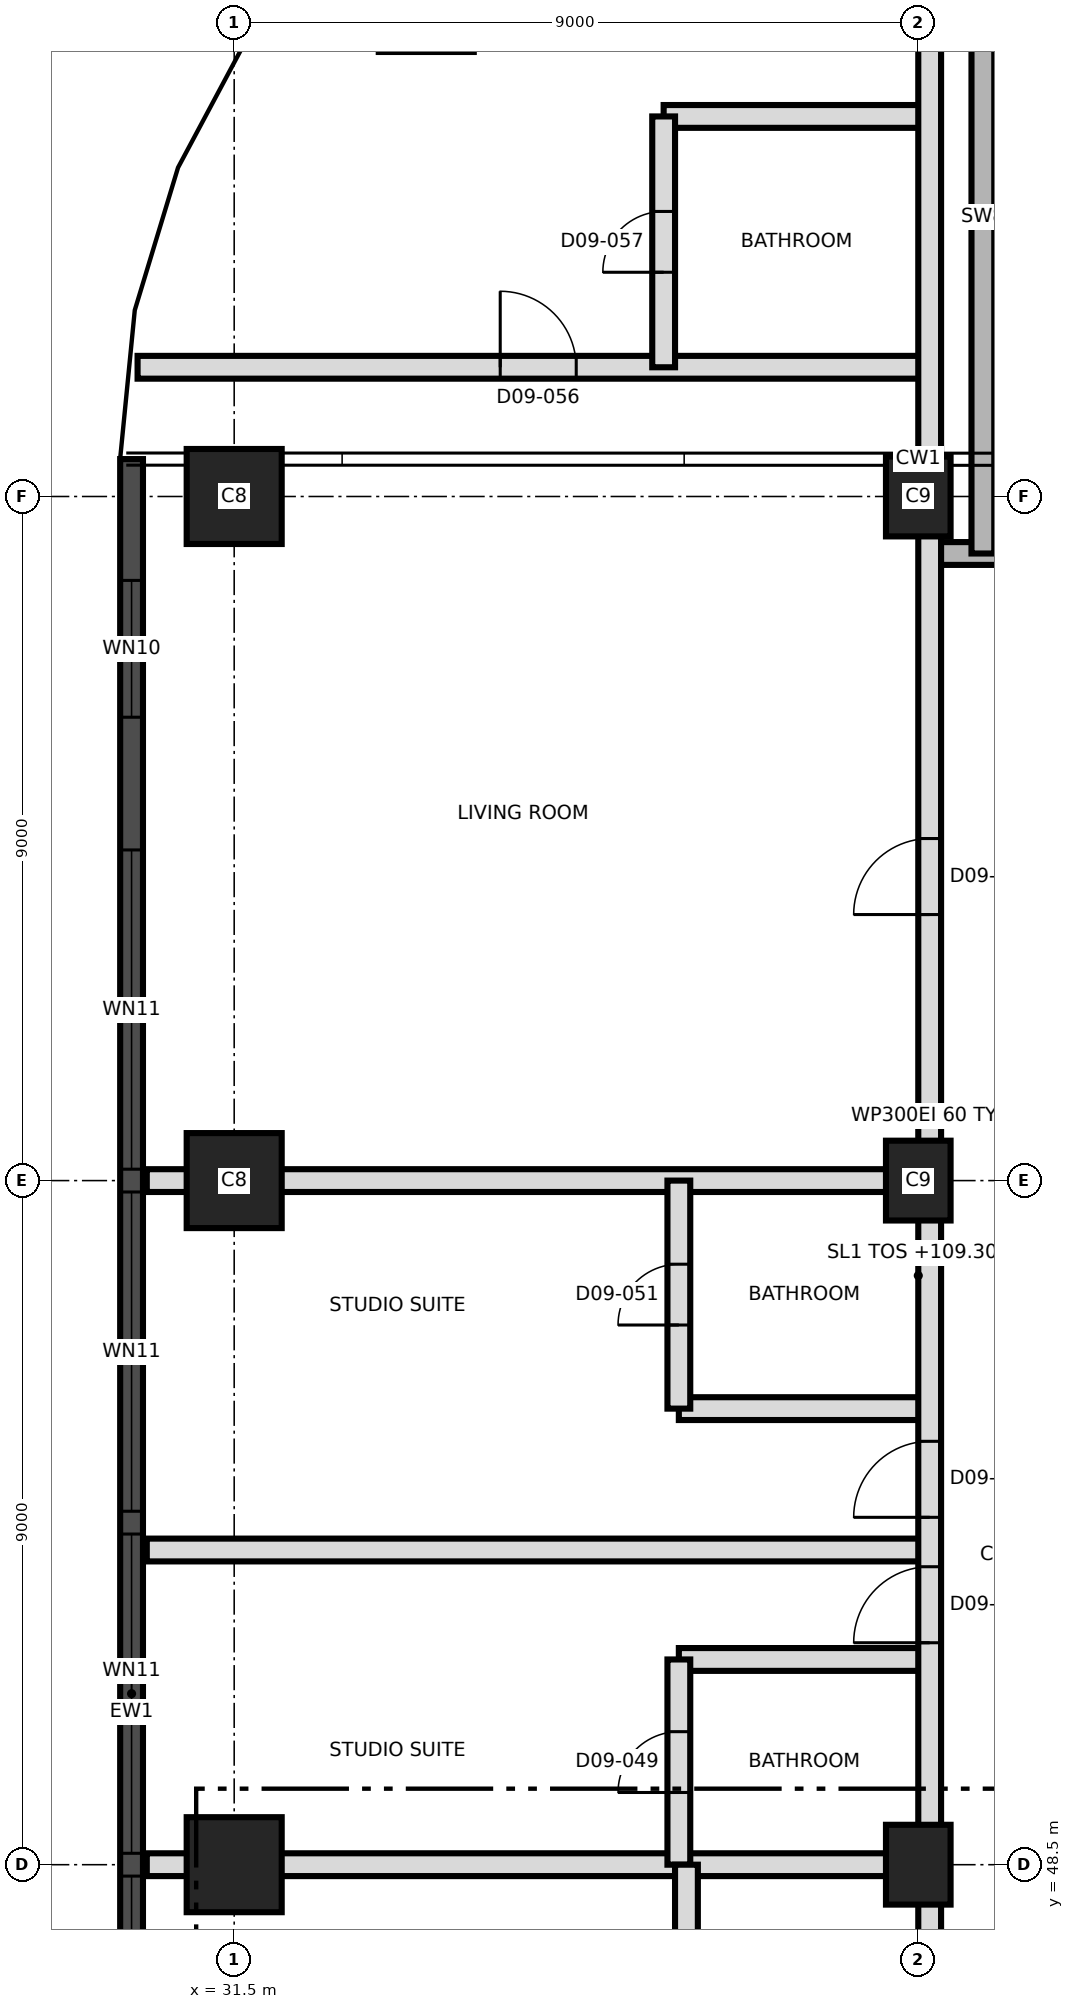
"""IFC4 building model, lengths in metres.
Left out: names, types, materials, properties, quantities, classifications, styles, units other than length and angle.
Written with IfcOpenShell. Run it as: python <this file> out.ifc"""

import sys

from ifc_helpers import new_model, si_unit, direction, frame, frame_2d, origin, origin_2d, place, context, subcontext, project, spatial, rectangle, extrude, element, fill, save


model = new_model("IFC4")
c1 = context("Model", 3, precision=1e-05, world=origin(), true_north=direction((0.0, 1.0)))
c2 = subcontext(c1, "Body", "Model", "MODEL_VIEW")
j1 = project(units=[si_unit("LENGTHUNIT", "METRE"), si_unit("PLANEANGLEUNIT", "RADIAN")], contexts=[c1])
p1 = place(None, origin())
s1 = spatial("IfcSite", under=j1, at=p1, CompositionType="ELEMENT")
p2 = place(p1, origin())
s2 = spatial("IfcBuilding", under=s1, at=p2, CompositionType="ELEMENT")
p3 = place(p2, frame((0.0, 0.0, 109.3)))
s3 = spatial("IfcBuildingStorey", under=s2, at=p3, CompositionType="ELEMENT", Elevation=109.3)
p4 = place(p3, frame((31.5, 48.5, 0.0), z_axis=(0.0, 0.0, 1.0), x_axis=(1.0, 0.0, 0.0)))
e1 = element("IfcColumn", 1, at=p4, inside=s3, PredefinedType="COLUMN", context=c2, shape_type="SweptSolid", body=[
    extrude(rectangle(XDim=1.25, YDim=1.25, at=origin_2d()), origin(), (0.0, 0.0, 1.0), 3.7),
])
p5 = place(p3, frame((40.5, 48.5, 0.0), z_axis=(0.0, 0.0, 1.0), x_axis=(0.0, 1.0, 0.0)))
e2 = element("IfcColumn", 2, at=p5, inside=s3, PredefinedType="COLUMN", context=c2, shape_type="SweptSolid", body=[
    extrude(rectangle(XDim=1.05, YDim=0.85, at=origin_2d()), origin(), (0.0, 0.0, 1.0), 3.7),
])
p6 = place(p3, frame((31.5, 57.5, 0.0), z_axis=(0.0, 0.0, 1.0), x_axis=(1.0, 0.0, 0.0)))
e3 = element("IfcColumn", 3, at=p6, inside=s3, PredefinedType="COLUMN", context=c2, shape_type="SweptSolid", body=[
    extrude(rectangle(XDim=1.25, YDim=1.25, at=origin_2d()), origin(), (0.0, 0.0, 1.0), 3.7),
])
p7 = place(p3, frame((40.5, 57.5, 0.0), z_axis=(0.0, 0.0, 1.0), x_axis=(0.0, 1.0, 0.0)))
e4 = element("IfcColumn", 4, at=p7, inside=s3, PredefinedType="COLUMN", context=c2, shape_type="SweptSolid", body=[
    extrude(rectangle(XDim=1.05, YDim=0.85, at=origin_2d()), origin(), (0.0, 0.0, 1.0), 3.7),
])
p8 = place(p3, frame((31.5, 66.5, 0.0), z_axis=(0.0, 0.0, 1.0), x_axis=(1.0, 0.0, 0.0)))
e5 = element("IfcColumn", 5, at=p8, inside=s3, PredefinedType="COLUMN", context=c2, shape_type="SweptSolid", body=[
    extrude(rectangle(XDim=1.25, YDim=1.25, at=origin_2d()), origin(), (0.0, 0.0, 1.0), 3.7),
])
p9 = place(p3, frame((40.5, 66.5, 0.0), z_axis=(0.0, 0.0, 1.0), x_axis=(0.0, 1.0, 0.0)))
e6 = element("IfcColumn", 6, at=p9, inside=s3, PredefinedType="COLUMN", context=c2, shape_type="SweptSolid", body=[
    extrude(rectangle(XDim=1.05, YDim=0.85, at=origin_2d()), origin(), (0.0, 0.0, 1.0), 3.7),
])
p10 = place(p3, frame((34.027, 72.973, 0.0), z_axis=(0.0, 0.0, 1.0), x_axis=(1.0, 0.0, 0.0)))
e7 = element("IfcColumn", 7, at=p10, inside=s3, PredefinedType="COLUMN", context=c2, shape_type="SweptSolid", body=[
    extrude(rectangle(XDim=1.25, YDim=1.25, at=origin_2d()), origin(), (0.0, 0.0, 1.0), 3.7),
])
p11 = place(p3, frame((30.15, 66.992, 0.0), z_axis=(0.0, 0.0, 1.0), x_axis=(0.0, -1.0, 0.0)))
e8 = element("IfcWall", 8, at=p11, inside=s3, PredefinedType="SOLIDWALL", context=c2, shape_type="SweptSolid", body=[
    extrude(rectangle(XDim=32.968, YDim=0.3, at=frame_2d((16.484, 0.0))), origin(), (0.0, 0.0, 1.0), 3.4),
])
p12 = place(p11, frame((1.596, 0.0, 0.3)))
e9 = element("IfcOpeningElement", 9, at=p12, cuts=e8, PredefinedType="OPENING", context=c2, shape_type="SweptSolid", body=[
    extrude(rectangle(XDim=1.8, YDim=2.4, at=frame_2d((0.9, 1.2))), frame((0.0, 0.16, 0.0), z_axis=(0.0, -1.0, 0.0), x_axis=(1.0, 0.0, 0.0)), (0.0, 0.0, 1.0), 0.32),
])
p13 = place(p11, frame((5.142, 0.0, 0.9)))
e10 = element("IfcOpeningElement", 10, at=p13, cuts=e8, PredefinedType="OPENING", context=c2, shape_type="SweptSolid", body=[
    extrude(rectangle(XDim=4.2, YDim=1.5, at=frame_2d((2.1, 0.75))), frame((0.0, 0.16, 0.0), z_axis=(0.0, -1.0, 0.0), x_axis=(1.0, 0.0, 0.0)), (0.0, 0.0, 1.0), 0.32),
])
p14 = place(p11, frame((9.642, 0.0, 0.9)))
e11 = element("IfcOpeningElement", 11, at=p14, cuts=e8, PredefinedType="OPENING", context=c2, shape_type="SweptSolid", body=[
    extrude(rectangle(XDim=4.2, YDim=1.5, at=frame_2d((2.1, 0.75))), frame((0.0, 0.16, 0.0), z_axis=(0.0, -1.0, 0.0), x_axis=(1.0, 0.0, 0.0)), (0.0, 0.0, 1.0), 0.32),
])
p15 = place(p11, frame((14.142, 0.0, 0.9)))
e12 = element("IfcOpeningElement", 12, at=p15, cuts=e8, PredefinedType="OPENING", context=c2, shape_type="SweptSolid", body=[
    extrude(rectangle(XDim=4.2, YDim=1.5, at=frame_2d((2.1, 0.75))), frame((0.0, 0.16, 0.0), z_axis=(0.0, -1.0, 0.0), x_axis=(1.0, 0.0, 0.0)), (0.0, 0.0, 1.0), 0.32),
])
p16 = place(p11, frame((18.642, 0.0, 0.9)))
e13 = element("IfcOpeningElement", 13, at=p16, cuts=e8, PredefinedType="OPENING", context=c2, shape_type="SweptSolid", body=[
    extrude(rectangle(XDim=4.2, YDim=1.5, at=frame_2d((2.1, 0.75))), frame((0.0, 0.16, 0.0), z_axis=(0.0, -1.0, 0.0), x_axis=(1.0, 0.0, 0.0)), (0.0, 0.0, 1.0), 0.32),
])
p17 = place(p11, frame((23.142, 0.0, 0.9)))
e14 = element("IfcOpeningElement", 14, at=p17, cuts=e8, PredefinedType="OPENING", context=c2, shape_type="SweptSolid", body=[
    extrude(rectangle(XDim=4.2, YDim=1.5, at=frame_2d((2.1, 0.75))), frame((0.0, 0.16, 0.0), z_axis=(0.0, -1.0, 0.0), x_axis=(1.0, 0.0, 0.0)), (0.0, 0.0, 1.0), 0.32),
])
p18 = place(p11, frame((29.33, 0.0, 0.3)))
e15 = element("IfcOpeningElement", 15, at=p18, cuts=e8, PredefinedType="OPENING", context=c2, shape_type="SweptSolid", body=[
    extrude(rectangle(XDim=1.8, YDim=2.4, at=frame_2d((0.9, 1.2))), frame((0.0, 0.16, 0.0), z_axis=(0.0, -1.0, 0.0), x_axis=(1.0, 0.0, 0.0)), (0.0, 0.0, 1.0), 0.32),
])
p19 = place(p3, frame((30.35, 48.5, 0.0), z_axis=(0.0, 0.0, 1.0), x_axis=(1.0, 0.0, 0.0)))
e16 = element("IfcWall", 16, at=p19, inside=s3, PredefinedType="PARTITIONING", context=c2, shape_type="SweptSolid", body=[
    extrude(rectangle(XDim=10.3, YDim=0.3, at=frame_2d((5.15, 0.0))), origin(), (0.0, 0.0, 1.0), 3.4),
])
p20 = place(p3, frame((37.35, 51.2, 0.0), z_axis=(0.0, 0.0, 1.0), x_axis=(1.0, 0.0, 0.0)))
e17 = element("IfcWall", 17, at=p20, inside=s3, PredefinedType="PARTITIONING", context=c2, shape_type="SweptSolid", body=[
    extrude(rectangle(XDim=3.3, YDim=0.3, at=frame_2d((1.65, 0.0))), origin(), (0.0, 0.0, 1.0), 3.4),
])
p21 = place(p3, frame((30.35, 52.64, 0.0), z_axis=(0.0, 0.0, 1.0), x_axis=(1.0, 0.0, 0.0)))
e18 = element("IfcWall", 18, at=p21, inside=s3, PredefinedType="PARTITIONING", context=c2, shape_type="SweptSolid", body=[
    extrude(rectangle(XDim=10.3, YDim=0.3, at=frame_2d((5.15, 0.0))), origin(), (0.0, 0.0, 1.0), 3.4),
])
p22 = place(p3, frame((37.35, 54.5, 0.0), z_axis=(0.0, 0.0, 1.0), x_axis=(1.0, 0.0, 0.0)))
e19 = element("IfcWall", 19, at=p22, inside=s3, PredefinedType="PARTITIONING", context=c2, shape_type="SweptSolid", body=[
    extrude(rectangle(XDim=3.3, YDim=0.3, at=frame_2d((1.65, 0.0))), origin(), (0.0, 0.0, 1.0), 3.4),
])
p23 = place(p3, frame((30.35, 57.5, 0.0), z_axis=(0.0, 0.0, 1.0), x_axis=(1.0, 0.0, 0.0)))
e20 = element("IfcWall", 20, at=p23, inside=s3, PredefinedType="PARTITIONING", context=c2, shape_type="SweptSolid", body=[
    extrude(rectangle(XDim=10.3, YDim=0.3, at=frame_2d((5.15, 0.0))), origin(), (0.0, 0.0, 1.0), 3.4),
])
p24 = place(p3, frame((40.65, 65.75, 0.0), z_axis=(0.0, 0.0, 1.0), x_axis=(1.0, 0.0, 0.0)))
e21 = element("IfcWall", 21, at=p24, inside=s3, PredefinedType="SHEAR", context=c2, shape_type="SweptSolid", body=[
    extrude(rectangle(XDim=3.7, YDim=0.3, at=frame_2d((1.85, 0.0))), origin(), (0.0, 0.0, 1.0), 3.4),
])
p25 = place(p24, frame((1.1, 0.0, 0.0)))
e22 = element("IfcOpeningElement", 22, at=p25, cuts=e21, PredefinedType="OPENING", context=c2, shape_type="SweptSolid", body=[
    extrude(rectangle(XDim=1.2, YDim=2.1, at=frame_2d((0.6, 1.05))), frame((0.0, 0.16, 0.0), z_axis=(0.0, -1.0, 0.0), x_axis=(1.0, 0.0, 0.0)), (0.0, 0.0, 1.0), 0.32),
])
p26 = place(p3, frame((30.229, 68.2, 0.0), z_axis=(0.0, 0.0, 1.0), x_axis=(1.0, 0.0, 0.0)))
e23 = element("IfcWall", 23, at=p26, inside=s3, PredefinedType="PARTITIONING", context=c2, shape_type="SweptSolid", body=[
    extrude(rectangle(XDim=10.421, YDim=0.3, at=frame_2d((5.21, 0.0))), origin(), (0.0, 0.0, 1.0), 3.4),
])
p27 = place(p26, frame((4.771, 0.0, 0.0)))
e24 = element("IfcOpeningElement", 24, at=p27, cuts=e23, PredefinedType="OPENING", context=c2, shape_type="SweptSolid", body=[
    extrude(rectangle(XDim=1.0, YDim=2.1, at=frame_2d((0.5, 1.05))), frame((0.0, 0.16, 0.0), z_axis=(0.0, -1.0, 0.0), x_axis=(1.0, 0.0, 0.0)), (0.0, 0.0, 1.0), 0.32),
])
p28 = place(p3, frame((37.15, 71.5, 0.0), z_axis=(0.0, 0.0, 1.0), x_axis=(1.0, 0.0, 0.0)))
e25 = element("IfcWall", 25, at=p28, inside=s3, PredefinedType="PARTITIONING", context=c2, shape_type="SweptSolid", body=[
    extrude(rectangle(XDim=3.5, YDim=0.3, at=frame_2d((1.75, 0.0))), origin(), (0.0, 0.0, 1.0), 3.4),
])
p29 = place(p3, frame((37.15, 68.2, 0.0), z_axis=(0.0, 0.0, 1.0), x_axis=(0.0, 1.0, 0.0)))
e26 = element("IfcWall", 26, at=p29, inside=s3, PredefinedType="PARTITIONING", context=c2, shape_type="SweptSolid", body=[
    extrude(rectangle(XDim=3.3, YDim=0.3, at=frame_2d((1.65, 0.0))), origin(), (0.0, 0.0, 1.0), 3.4),
])
p30 = place(p29, frame((1.25, 0.0, 0.0)))
e27 = element("IfcOpeningElement", 27, at=p30, cuts=e26, PredefinedType="OPENING", context=c2, shape_type="SweptSolid", body=[
    extrude(rectangle(XDim=0.8, YDim=2.1, at=frame_2d((0.4, 1.05))), frame((0.0, 0.16, 0.0), z_axis=(0.0, -1.0, 0.0), x_axis=(1.0, 0.0, 0.0)), (0.0, 0.0, 1.0), 0.32),
])
p31 = place(p3, frame((37.35, 48.5, 0.0), z_axis=(0.0, 0.0, 1.0), x_axis=(0.0, 1.0, 0.0)))
e28 = element("IfcWall", 28, at=p31, inside=s3, PredefinedType="PARTITIONING", context=c2, shape_type="SweptSolid", body=[
    extrude(rectangle(XDim=2.7, YDim=0.3, at=frame_2d((1.35, 0.0))), origin(), (0.0, 0.0, 1.0), 3.4),
])
p32 = place(p31, frame((0.95, 0.0, 0.0)))
e29 = element("IfcOpeningElement", 29, at=p32, cuts=e28, PredefinedType="OPENING", context=c2, shape_type="SweptSolid", body=[
    extrude(rectangle(XDim=0.8, YDim=2.1, at=frame_2d((0.4, 1.05))), frame((0.0, 0.16, 0.0), z_axis=(0.0, -1.0, 0.0), x_axis=(1.0, 0.0, 0.0)), (0.0, 0.0, 1.0), 0.32),
])
p33 = place(p3, frame((37.35, 54.5, 0.0), z_axis=(0.0, 0.0, 1.0), x_axis=(0.0, 1.0, 0.0)))
e30 = element("IfcWall", 30, at=p33, inside=s3, PredefinedType="PARTITIONING", context=c2, shape_type="SweptSolid", body=[
    extrude(rectangle(XDim=3.0, YDim=0.3, at=frame_2d((1.5, 0.0))), origin(), (0.0, 0.0, 1.0), 3.4),
])
p34 = place(p33, frame((1.1, 0.0, 0.0)))
e31 = element("IfcOpeningElement", 31, at=p34, cuts=e30, PredefinedType="OPENING", context=c2, shape_type="SweptSolid", body=[
    extrude(rectangle(XDim=0.8, YDim=2.1, at=frame_2d((0.4, 1.05))), frame((0.0, 0.16, 0.0), z_axis=(0.0, -1.0, 0.0), x_axis=(1.0, 0.0, 0.0)), (0.0, 0.0, 1.0), 0.32),
])
p35 = place(p3, frame((37.45, 45.8, 0.0), z_axis=(0.0, 0.0, 1.0), x_axis=(0.0, 1.0, 0.0)))
e32 = element("IfcWall", 32, at=p35, inside=s3, PredefinedType="PARTITIONING", context=c2, shape_type="SweptSolid", body=[
    extrude(rectangle(XDim=2.7, YDim=0.3, at=frame_2d((1.35, 0.0))), origin(), (0.0, 0.0, 1.0), 3.4),
])
p36 = place(p35, frame((0.95, 0.0, 0.0)))
e33 = element("IfcOpeningElement", 33, at=p36, cuts=e32, PredefinedType="OPENING", context=c2, shape_type="SweptSolid", body=[
    extrude(rectangle(XDim=0.8, YDim=2.1, at=frame_2d((0.4, 1.05))), frame((0.0, 0.16, 0.0), z_axis=(0.0, -1.0, 0.0), x_axis=(1.0, 0.0, 0.0)), (0.0, 0.0, 1.0), 0.32),
])
p37 = place(p3, frame((40.65, 39.8, 0.0), z_axis=(0.0, 0.0, 1.0), x_axis=(0.0, 1.0, 0.0)))
e34 = element("IfcWall", 34, at=p37, inside=s3, PredefinedType="PARTITIONING", context=c2, shape_type="SweptSolid", body=[
    extrude(rectangle(XDim=37.09, YDim=0.3, at=frame_2d((18.545, 0.0))), origin(), (0.0, 0.0, 1.0), 3.4),
])
p38 = place(p37, frame((0.835, 0.0, 0.0)))
e35 = element("IfcOpeningElement", 35, at=p38, cuts=e34, PredefinedType="OPENING", context=c2, shape_type="SweptSolid", body=[
    extrude(rectangle(XDim=1.2, YDim=2.1, at=frame_2d((0.6, 1.05))), frame((0.0, 0.16, 0.0), z_axis=(0.0, -1.0, 0.0), x_axis=(1.0, 0.0, 0.0)), (0.0, 0.0, 1.0), 0.32),
])
p39 = place(p37, frame((4.085, 0.0, 0.0)))
e36 = element("IfcOpeningElement", 36, at=p39, cuts=e34, PredefinedType="OPENING", context=c2, shape_type="SweptSolid", body=[
    extrude(rectangle(XDim=1.0, YDim=2.1, at=frame_2d((0.5, 1.05))), frame((0.0, 0.16, 0.0), z_axis=(0.0, -1.0, 0.0), x_axis=(1.0, 0.0, 0.0)), (0.0, 0.0, 1.0), 0.32),
])
p40 = place(p37, frame((11.62, 0.0, 0.0)))
e37 = element("IfcOpeningElement", 37, at=p40, cuts=e34, PredefinedType="OPENING", context=c2, shape_type="SweptSolid", body=[
    extrude(rectangle(XDim=1.0, YDim=2.4, at=frame_2d((0.5, 1.2))), frame((0.0, 0.16, 0.0), z_axis=(0.0, -1.0, 0.0), x_axis=(1.0, 0.0, 0.0)), (0.0, 0.0, 1.0), 0.32),
])
p41 = place(p37, frame((13.27, 0.0, 0.0)))
e38 = element("IfcOpeningElement", 38, at=p41, cuts=e34, PredefinedType="OPENING", context=c2, shape_type="SweptSolid", body=[
    extrude(rectangle(XDim=1.0, YDim=2.4, at=frame_2d((0.5, 1.2))), frame((0.0, 0.16, 0.0), z_axis=(0.0, -1.0, 0.0), x_axis=(1.0, 0.0, 0.0)), (0.0, 0.0, 1.0), 0.32),
])
p42 = place(p37, frame((21.2, 0.0, 0.0)))
e39 = element("IfcOpeningElement", 39, at=p42, cuts=e34, PredefinedType="OPENING", context=c2, shape_type="SweptSolid", body=[
    extrude(rectangle(XDim=1.0, YDim=2.4, at=frame_2d((0.5, 1.2))), frame((0.0, 0.16, 0.0), z_axis=(0.0, -1.0, 0.0), x_axis=(1.0, 0.0, 0.0)), (0.0, 0.0, 1.0), 0.32),
])
p43 = place(p3, frame((41.35, 65.75, 0.0), z_axis=(0.0, 0.0, 1.0), x_axis=(0.0, 1.0, 0.0)))
e40 = element("IfcWall", 40, at=p43, inside=s3, PredefinedType="SHEAR", context=c2, shape_type="SweptSolid", body=[
    extrude(rectangle(XDim=8.85, YDim=0.3, at=frame_2d((4.425, 0.0))), origin(), (0.0, 0.0, 1.0), 3.4),
])
p44 = place(p12, origin())
e41 = element("IfcWindow", 41, at=p44, inside=s3, PartitioningType="SINGLE_PANEL", PredefinedType="WINDOW", context=c2, shape_type="SweptSolid", body=[
    extrude(rectangle(XDim=1.8, YDim=2.4, at=frame_2d((0.9, 1.2))), frame((0.0, 0.03, 0.0), z_axis=(0.0, -1.0, 0.0), x_axis=(1.0, 0.0, 0.0)), (0.0, 0.0, 1.0), 0.06),
])
fill(e9, e41)
p45 = place(p13, origin())
e42 = element("IfcWindow", 42, at=p45, inside=s3, PartitioningType="SINGLE_PANEL", PredefinedType="WINDOW", context=c2, shape_type="SweptSolid", body=[
    extrude(rectangle(XDim=4.2, YDim=1.5, at=frame_2d((2.1, 0.75))), frame((0.0, 0.03, 0.0), z_axis=(0.0, -1.0, 0.0), x_axis=(1.0, 0.0, 0.0)), (0.0, 0.0, 1.0), 0.06),
])
fill(e10, e42)
p46 = place(p14, origin())
e43 = element("IfcWindow", 43, at=p46, inside=s3, PartitioningType="SINGLE_PANEL", PredefinedType="WINDOW", context=c2, shape_type="SweptSolid", body=[
    extrude(rectangle(XDim=4.2, YDim=1.5, at=frame_2d((2.1, 0.75))), frame((0.0, 0.03, 0.0), z_axis=(0.0, -1.0, 0.0), x_axis=(1.0, 0.0, 0.0)), (0.0, 0.0, 1.0), 0.06),
])
fill(e11, e43)
p47 = place(p15, origin())
e44 = element("IfcWindow", 44, at=p47, inside=s3, PartitioningType="SINGLE_PANEL", PredefinedType="WINDOW", context=c2, shape_type="SweptSolid", body=[
    extrude(rectangle(XDim=4.2, YDim=1.5, at=frame_2d((2.1, 0.75))), frame((0.0, 0.03, 0.0), z_axis=(0.0, -1.0, 0.0), x_axis=(1.0, 0.0, 0.0)), (0.0, 0.0, 1.0), 0.06),
])
fill(e12, e44)
p48 = place(p16, origin())
e45 = element("IfcWindow", 45, at=p48, inside=s3, PartitioningType="SINGLE_PANEL", PredefinedType="WINDOW", context=c2, shape_type="SweptSolid", body=[
    extrude(rectangle(XDim=4.2, YDim=1.5, at=frame_2d((2.1, 0.75))), frame((0.0, 0.03, 0.0), z_axis=(0.0, -1.0, 0.0), x_axis=(1.0, 0.0, 0.0)), (0.0, 0.0, 1.0), 0.06),
])
fill(e13, e45)
p49 = place(p32, origin())
e46 = element("IfcDoor", 46, at=p49, inside=s3, OperationType="SINGLE_SWING_RIGHT", PredefinedType="DOOR", context=c2, shape_type="SweptSolid", body=[
    extrude(rectangle(XDim=0.8, YDim=2.1, at=frame_2d((0.4, 1.05))), frame((0.0, 0.025, 0.0), z_axis=(0.0, -1.0, 0.0), x_axis=(1.0, 0.0, 0.0)), (0.0, 0.0, 1.0), 0.05),
])
fill(e29, e46)
p50 = place(p40, origin())
e47 = element("IfcDoor", 47, at=p50, inside=s3, OperationType="SINGLE_SWING_LEFT", PredefinedType="DOOR", context=c2, shape_type="SweptSolid", body=[
    extrude(rectangle(XDim=1.0, YDim=2.4, at=frame_2d((0.5, 1.2))), frame((0.0, 0.025, 0.0), z_axis=(0.0, -1.0, 0.0), x_axis=(1.0, 0.0, 0.0)), (0.0, 0.0, 1.0), 0.05),
])
fill(e37, e47)
p51 = place(p34, origin())
e48 = element("IfcDoor", 48, at=p51, inside=s3, OperationType="SINGLE_SWING_LEFT", PredefinedType="DOOR", context=c2, shape_type="SweptSolid", body=[
    extrude(rectangle(XDim=0.8, YDim=2.1, at=frame_2d((0.4, 1.05))), frame((0.0, 0.025, 0.0), z_axis=(0.0, -1.0, 0.0), x_axis=(1.0, 0.0, 0.0)), (0.0, 0.0, 1.0), 0.05),
])
fill(e31, e48)
p52 = place(p41, origin())
e49 = element("IfcDoor", 49, at=p52, inside=s3, OperationType="SINGLE_SWING_LEFT", PredefinedType="DOOR", context=c2, shape_type="SweptSolid", body=[
    extrude(rectangle(XDim=1.0, YDim=2.4, at=frame_2d((0.5, 1.2))), frame((0.0, 0.025, 0.0), z_axis=(0.0, -1.0, 0.0), x_axis=(1.0, 0.0, 0.0)), (0.0, 0.0, 1.0), 0.05),
])
fill(e38, e49)
p53 = place(p42, origin())
e50 = element("IfcDoor", 50, at=p53, inside=s3, OperationType="SINGLE_SWING_LEFT", PredefinedType="DOOR", context=c2, shape_type="SweptSolid", body=[
    extrude(rectangle(XDim=1.0, YDim=2.4, at=frame_2d((0.5, 1.2))), frame((0.0, 0.025, 0.0), z_axis=(0.0, -1.0, 0.0), x_axis=(1.0, 0.0, 0.0)), (0.0, 0.0, 1.0), 0.05),
])
fill(e39, e50)
p54 = place(p27, origin())
e51 = element("IfcDoor", 51, at=p54, inside=s3, OperationType="SINGLE_SWING_RIGHT", PredefinedType="DOOR", context=c2, shape_type="SweptSolid", body=[
    extrude(rectangle(XDim=1.0, YDim=2.1, at=frame_2d((0.5, 1.05))), frame((0.0, 0.025, 0.0), z_axis=(0.0, -1.0, 0.0), x_axis=(1.0, 0.0, 0.0)), (0.0, 0.0, 1.0), 0.05),
])
fill(e24, e51)
p55 = place(p30, origin())
e52 = element("IfcDoor", 52, at=p55, inside=s3, OperationType="SINGLE_SWING_LEFT", PredefinedType="DOOR", context=c2, shape_type="SweptSolid", body=[
    extrude(rectangle(XDim=0.8, YDim=2.1, at=frame_2d((0.4, 1.05))), frame((0.0, 0.025, 0.0), z_axis=(0.0, -1.0, 0.0), x_axis=(1.0, 0.0, 0.0)), (0.0, 0.0, 1.0), 0.05),
])
fill(e27, e52)
save(model, sys.argv[1])
